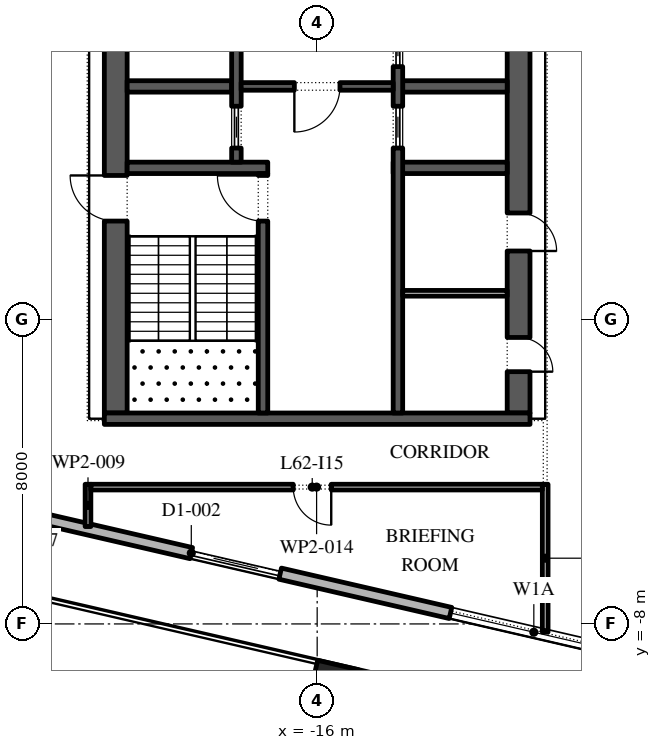
"""IFC4 building model, lengths in metres.
Left out: names, types, materials, properties, quantities, classifications, styles, units other than length and angle.
Written with IfcOpenShell. Run it as: python <this file> out.ifc"""

import sys

from ifc_helpers import new_model, si_unit, direction, frame, frame_2d, origin, origin_2d, place, context, subcontext, project, spatial, rectangle, extrude, element, fill, save


model = new_model("IFC4")
c1 = context("Model", 3, precision=1e-05, world=origin(), true_north=direction((0.0, 1.0)))
c2 = subcontext(c1, "Body", "Model", "MODEL_VIEW")
j1 = project(units=[si_unit("LENGTHUNIT", "METRE"), si_unit("PLANEANGLEUNIT", "RADIAN")], contexts=[c1])
p1 = place(None, origin())
s1 = spatial("IfcSite", under=j1, at=p1, CompositionType="ELEMENT")
p2 = place(p1, origin())
s2 = spatial("IfcBuilding", under=s1, at=p2, CompositionType="ELEMENT")
p3 = place(p2, frame((0.0, 0.0, 285.0)))
s3 = spatial("IfcBuildingStorey", under=s2, at=p3, CompositionType="ELEMENT", Elevation=285.0)
p4 = place(p3, frame((-15.574, -9.617, 0.0), z_axis=(0.0, 0.0, 1.0), x_axis=(0.974370064785, -0.224951054344, 0.0)))
e1 = element("IfcColumn", 1, at=p4, inside=s3, PredefinedType="COLUMN", context=c2, shape_type="SweptSolid", body=[
    extrude(rectangle(XDim=1.1, YDim=1.1, at=origin_2d()), origin(), (0.0, 0.0, 1.0), 4.2),
])
p5 = place(p3, frame((-29.616, -3.758, 0.0), z_axis=(0.0, 0.0, 1.0), x_axis=(0.974370532314, -0.224949029246, 0.0)))
e2 = element("IfcWall", 2, at=p5, inside=s3, PredefinedType="STANDARD", context=c2, shape_type="SweptSolid", body=[
    extrude(rectangle(XDim=48.0, YDim=0.3, at=frame_2d((24.0, 0.0))), origin(), (0.0, 0.0, 1.0), 4.0),
])
p6 = place(p5, frame((1.625, 0.0, 0.45)))
e3 = element("IfcOpeningElement", 3, at=p6, cuts=e2, PredefinedType="OPENING", context=c2, shape_type="SweptSolid", body=[
    extrude(rectangle(XDim=4.5, YDim=3.05, at=frame_2d((2.25, 1.525))), frame((0.0, 0.16, 0.0), z_axis=(0.0, -1.0, 0.0), x_axis=(1.0, 0.0, 0.0)), (0.0, 0.0, 1.0), 0.32),
])
p7 = place(p5, frame((10.575, 0.0, 0.0)))
e4 = element("IfcOpeningElement", 4, at=p7, cuts=e2, PredefinedType="OPENING", context=c2, shape_type="SweptSolid", body=[
    extrude(rectangle(XDim=2.4, YDim=3.5, at=frame_2d((1.2, 1.75))), frame((0.0, 0.16, 0.0), z_axis=(0.0, -1.0, 0.0), x_axis=(1.0, 0.0, 0.0)), (0.0, 0.0, 1.0), 0.32),
])
p8 = place(p5, frame((17.575, 0.0, 0.45)))
e5 = element("IfcOpeningElement", 5, at=p8, cuts=e2, PredefinedType="OPENING", context=c2, shape_type="SweptSolid", body=[
    extrude(rectangle(XDim=4.5, YDim=3.0, at=frame_2d((2.25, 1.5))), frame((0.0, 0.16, 0.0), z_axis=(0.0, -1.0, 0.0), x_axis=(1.0, 0.0, 0.0)), (0.0, 0.0, 1.0), 0.32),
])
p9 = place(p5, frame((25.625, 0.0, 0.45)))
e6 = element("IfcOpeningElement", 6, at=p9, cuts=e2, PredefinedType="OPENING", context=c2, shape_type="SweptSolid", body=[
    extrude(rectangle(XDim=4.5, YDim=2.95, at=frame_2d((2.25, 1.475))), frame((0.0, 0.16, 0.0), z_axis=(0.0, -1.0, 0.0), x_axis=(1.0, 0.0, 0.0)), (0.0, 0.0, 1.0), 0.32),
])
p10 = place(p5, frame((33.675, 0.0, 0.45)))
e7 = element("IfcOpeningElement", 7, at=p10, cuts=e2, PredefinedType="OPENING", context=c2, shape_type="SweptSolid", body=[
    extrude(rectangle(XDim=4.5, YDim=2.825, at=frame_2d((2.25, 1.413))), frame((0.0, 0.16, 0.0), z_axis=(0.0, -1.0, 0.0), x_axis=(1.0, 0.0, 0.0)), (0.0, 0.0, 1.0), 0.32),
])
p11 = place(p5, frame((42.775, 0.0, 0.0)))
e8 = element("IfcOpeningElement", 8, at=p11, cuts=e2, PredefinedType="OPENING", context=c2, shape_type="SweptSolid", body=[
    extrude(rectangle(XDim=2.4, YDim=3.5, at=frame_2d((1.2, 1.75))), frame((0.0, 0.16, 0.0), z_axis=(0.0, -1.0, 0.0), x_axis=(1.0, 0.0, 0.0)), (0.0, 0.0, 1.0), 0.32),
])
p12 = place(p3, frame((-21.359, 48.678, 0.0), z_axis=(0.0, 0.0, 1.0), x_axis=(-0.224949198343, -0.974370493275, 0.0)))
e9 = element("IfcWall", 9, at=p12, inside=s3, PredefinedType="STANDARD", context=c2, shape_type="SweptSolid", body=[
    extrude(rectangle(XDim=49.5, YDim=0.3, at=frame_2d((24.75, 0.0))), origin(), (0.0, 0.0, 1.0), 4.0),
])
p13 = place(p12, frame((1.157, 0.0, 0.45)))
e10 = element("IfcOpeningElement", 10, at=p13, cuts=e9, PredefinedType="OPENING", context=c2, shape_type="SweptSolid", body=[
    extrude(rectangle(XDim=4.5, YDim=3.05, at=frame_2d((2.25, 1.525))), frame((0.0, 0.16, 0.0), z_axis=(0.0, -1.0, 0.0), x_axis=(1.0, 0.0, 0.0)), (0.0, 0.0, 1.0), 0.32),
])
p14 = place(p12, frame((9.171, 0.0, 0.0)))
e11 = element("IfcOpeningElement", 11, at=p14, cuts=e9, PredefinedType="OPENING", context=c2, shape_type="SweptSolid", body=[
    extrude(rectangle(XDim=2.4, YDim=3.5, at=frame_2d((1.2, 1.75))), frame((0.0, 0.16, 0.0), z_axis=(0.0, -1.0, 0.0), x_axis=(1.0, 0.0, 0.0)), (0.0, 0.0, 1.0), 0.32),
])
p15 = place(p12, frame((15.236, 0.0, 0.45)))
e12 = element("IfcOpeningElement", 12, at=p15, cuts=e9, PredefinedType="OPENING", context=c2, shape_type="SweptSolid", body=[
    extrude(rectangle(XDim=4.5, YDim=3.05, at=frame_2d((2.25, 1.525))), frame((0.0, 0.16, 0.0), z_axis=(0.0, -1.0, 0.0), x_axis=(1.0, 0.0, 0.0)), (0.0, 0.0, 1.0), 0.32),
])
p16 = place(p12, frame((22.35, 0.0, 0.45)))
e13 = element("IfcOpeningElement", 13, at=p16, cuts=e9, PredefinedType="OPENING", context=c2, shape_type="SweptSolid", body=[
    extrude(rectangle(XDim=4.5, YDim=3.05, at=frame_2d((2.25, 1.525))), frame((0.0, 0.16, 0.0), z_axis=(0.0, -1.0, 0.0), x_axis=(1.0, 0.0, 0.0)), (0.0, 0.0, 1.0), 0.32),
])
p17 = place(p12, frame((29.464, 0.0, 0.45)))
e14 = element("IfcOpeningElement", 14, at=p17, cuts=e9, PredefinedType="OPENING", context=c2, shape_type="SweptSolid", body=[
    extrude(rectangle(XDim=4.5, YDim=3.05, at=frame_2d((2.25, 1.525))), frame((0.0, 0.16, 0.0), z_axis=(0.0, -1.0, 0.0), x_axis=(1.0, 0.0, 0.0)), (0.0, 0.0, 1.0), 0.32),
])
p18 = place(p12, frame((37.628, 0.0, 0.0)))
e15 = element("IfcOpeningElement", 15, at=p18, cuts=e9, PredefinedType="OPENING", context=c2, shape_type="SweptSolid", body=[
    extrude(rectangle(XDim=2.4, YDim=3.325, at=frame_2d((1.2, 1.663))), frame((0.0, 0.16, 0.0), z_axis=(0.0, -1.0, 0.0), x_axis=(1.0, 0.0, 0.0)), (0.0, 0.0, 1.0), 0.32),
])
p19 = place(p12, frame((43.693, 0.0, 0.45)))
e16 = element("IfcOpeningElement", 16, at=p19, cuts=e9, PredefinedType="OPENING", context=c2, shape_type="SweptSolid", body=[
    extrude(rectangle(XDim=4.5, YDim=2.825, at=frame_2d((2.25, 1.413))), frame((0.0, 0.16, 0.0), z_axis=(0.0, -1.0, 0.0), x_axis=(1.0, 0.0, 0.0)), (0.0, 0.0, 1.0), 0.32),
])
p20 = place(p3, frame((-21.3, -2.45, 0.0), z_axis=(0.0, 0.0, 1.0), x_axis=(0.0, 1.0, 0.0)))
e17 = element("IfcWall", 17, at=p20, inside=s3, PredefinedType="SHEAR", context=c2, shape_type="SweptSolid", body=[
    extrude(rectangle(XDim=27.9, YDim=0.6, at=frame_2d((13.95, 0.0))), origin(), (0.0, 0.0, 1.0), 4.0),
])
p21 = place(p20, frame((5.05, 0.0, 0.0)))
e18 = element("IfcOpeningElement", 18, at=p21, cuts=e17, PredefinedType="OPENING", context=c2, shape_type="SweptSolid", body=[
    extrude(rectangle(XDim=1.2, YDim=2.1, at=frame_2d((0.6, 1.05))), frame((0.0, 0.31, 0.0), z_axis=(0.0, -1.0, 0.0), x_axis=(1.0, 0.0, 0.0)), (0.0, 0.0, 1.0), 0.62),
])
p22 = place(p20, frame((21.65, 0.0, 0.0)))
e19 = element("IfcOpeningElement", 19, at=p22, cuts=e17, PredefinedType="OPENING", context=c2, shape_type="SweptSolid", body=[
    extrude(rectangle(XDim=1.2, YDim=2.1, at=frame_2d((0.6, 1.05))), frame((0.0, 0.31, 0.0), z_axis=(0.0, -1.0, 0.0), x_axis=(1.0, 0.0, 0.0)), (0.0, 0.0, 1.0), 0.62),
])
p23 = place(p3, frame((-10.7, -2.45, 0.0), z_axis=(0.0, 0.0, 1.0), x_axis=(0.0, 1.0, 0.0)))
e20 = element("IfcWall", 20, at=p23, inside=s3, PredefinedType="SHEAR", context=c2, shape_type="SweptSolid", body=[
    extrude(rectangle(XDim=27.9, YDim=0.6, at=frame_2d((13.95, 0.0))), origin(), (0.0, 0.0, 1.0), 4.0),
])
p24 = place(p23, frame((23.65, 0.0, 0.0)))
e21 = element("IfcOpeningElement", 21, at=p24, cuts=e20, PredefinedType="OPENING", context=c2, shape_type="SweptSolid", body=[
    extrude(rectangle(XDim=2.4, YDim=2.1, at=frame_2d((1.2, 1.05))), frame((0.0, 0.31, 0.0), z_axis=(0.0, -1.0, 0.0), x_axis=(1.0, 0.0, 0.0)), (0.0, 0.0, 1.0), 0.62),
])
p25 = place(p23, frame((1.087, 0.0, 0.0)))
e22 = element("IfcOpeningElement", 22, at=p25, cuts=e20, PredefinedType="OPENING", context=c2, shape_type="SweptSolid", body=[
    extrude(rectangle(XDim=0.9, YDim=2.1, at=frame_2d((0.45, 1.05))), frame((0.0, 0.31, 0.0), z_axis=(0.0, -1.0, 0.0), x_axis=(1.0, 0.0, 0.0)), (0.0, 0.0, 1.0), 0.62),
])
p26 = place(p23, frame((4.262, 0.0, 0.0)))
e23 = element("IfcOpeningElement", 23, at=p26, cuts=e20, PredefinedType="OPENING", context=c2, shape_type="SweptSolid", body=[
    extrude(rectangle(XDim=1.0, YDim=2.1, at=frame_2d((0.5, 1.05))), frame((0.0, 0.31, 0.0), z_axis=(0.0, -1.0, 0.0), x_axis=(1.0, 0.0, 0.0)), (0.0, 0.0, 1.0), 0.62),
])
p27 = place(p3, frame((-21.6, -2.6, 0.0), z_axis=(0.0, 0.0, 1.0), x_axis=(1.0, 0.0, 0.0)))
e24 = element("IfcWall", 24, at=p27, inside=s3, PredefinedType="SHEAR", context=c2, shape_type="SweptSolid", body=[
    extrude(rectangle(XDim=11.2, YDim=0.3, at=frame_2d((5.6, 0.0))), origin(), (0.0, 0.0, 1.0), 4.0),
])
p28 = place(p3, frame((-21.0, 4.0, 0.0), z_axis=(0.0, 0.0, 1.0), x_axis=(1.0, 0.0, 0.0)))
e25 = element("IfcWall", 25, at=p28, inside=s3, PredefinedType="SHEAR", context=c2, shape_type="SweptSolid", body=[
    extrude(rectangle(XDim=3.7, YDim=0.3, at=frame_2d((1.85, 0.0))), origin(), (0.0, 0.0, 1.0), 4.0),
])
p29 = place(p3, frame((-17.425, -2.45, 0.0), z_axis=(0.0, 0.0, 1.0), x_axis=(0.0, 1.0, 0.0)))
e26 = element("IfcWall", 26, at=p29, inside=s3, PredefinedType="SHEAR", context=c2, shape_type="SweptSolid", body=[
    extrude(rectangle(XDim=6.3, YDim=0.25, at=frame_2d((3.15, 0.0))), origin(), (0.0, 0.0, 1.0), 4.0),
])
p30 = place(p29, frame((5.05, 0.0, 0.0)))
e27 = element("IfcOpeningElement", 27, at=p30, cuts=e26, PredefinedType="OPENING", context=c2, shape_type="SweptSolid", body=[
    extrude(rectangle(XDim=1.2, YDim=2.1, at=frame_2d((0.6, 1.05))), frame((0.0, 0.135, 0.0), z_axis=(0.0, -1.0, 0.0), x_axis=(1.0, 0.0, 0.0)), (0.0, 0.0, 1.0), 0.27),
])
p31 = place(p3, frame((-21.0, 6.143, 0.0), z_axis=(0.0, 0.0, 1.0), x_axis=(1.0, 0.0, 0.0)))
e28 = element("IfcWall", 28, at=p31, inside=s3, PredefinedType="SHEAR", context=c2, shape_type="SweptSolid", body=[
    extrude(rectangle(XDim=2.75, YDim=0.3, at=frame_2d((1.375, 0.0))), origin(), (0.0, 0.0, 1.0), 4.0),
])
p32 = place(p3, frame((-18.125, 4.15, 0.0), z_axis=(0.0, 0.0, 1.0), x_axis=(0.0, 1.0, 0.0)))
e29 = element("IfcWall", 29, at=p32, inside=s3, PredefinedType="SHEAR", context=c2, shape_type="SweptSolid", body=[
    extrude(rectangle(XDim=14.7, YDim=0.25, at=frame_2d((7.35, 0.0))), origin(), (0.0, 0.0, 1.0), 4.0),
])
p33 = place(p32, frame((6.9, 0.0, 0.0)))
e30 = element("IfcOpeningElement", 30, at=p33, cuts=e29, PredefinedType="OPENING", context=c2, shape_type="SweptSolid", body=[
    extrude(rectangle(XDim=0.9, YDim=2.1, at=frame_2d((0.45, 1.05))), frame((0.0, 0.135, 0.0), z_axis=(0.0, -1.0, 0.0), x_axis=(1.0, 0.0, 0.0)), (0.0, 0.0, 1.0), 0.27),
])
p34 = place(p32, frame((0.371, 0.0, 0.0)))
e31 = element("IfcOpeningElement", 31, at=p34, cuts=e29, PredefinedType="OPENING", context=c2, shape_type="SweptSolid", body=[
    extrude(rectangle(XDim=1.1, YDim=2.1, at=frame_2d((0.55, 1.05))), frame((0.0, 0.135, 0.0), z_axis=(0.0, -1.0, 0.0), x_axis=(1.0, 0.0, 0.0)), (0.0, 0.0, 1.0), 0.27),
])
p35 = place(p32, frame((13.229, 0.0, 0.0)))
e32 = element("IfcOpeningElement", 32, at=p35, cuts=e29, PredefinedType="OPENING", context=c2, shape_type="SweptSolid", body=[
    extrude(rectangle(XDim=1.1, YDim=2.1, at=frame_2d((0.55, 1.05))), frame((0.0, 0.135, 0.0), z_axis=(0.0, -1.0, 0.0), x_axis=(1.0, 0.0, 0.0)), (0.0, 0.0, 1.0), 0.27),
])
p36 = place(p3, frame((-14.0, 4.0, 0.0), z_axis=(0.0, 0.0, 1.0), x_axis=(1.0, 0.0, 0.0)))
e33 = element("IfcWall", 33, at=p36, inside=s3, PredefinedType="SHEAR", context=c2, shape_type="SweptSolid", body=[
    extrude(rectangle(XDim=3.0, YDim=0.3, at=frame_2d((1.5, 0.0))), origin(), (0.0, 0.0, 1.0), 4.0),
])
p37 = place(p3, frame((-13.75, 6.143, 0.0), z_axis=(0.0, 0.0, 1.0), x_axis=(1.0, 0.0, 0.0)))
e34 = element("IfcWall", 34, at=p37, inside=s3, PredefinedType="SHEAR", context=c2, shape_type="SweptSolid", body=[
    extrude(rectangle(XDim=2.75, YDim=0.3, at=frame_2d((1.375, 0.0))), origin(), (0.0, 0.0, 1.0), 4.0),
])
p38 = place(p3, frame((-13.875, -2.45, 0.0), z_axis=(0.0, 0.0, 1.0), x_axis=(0.0, 1.0, 0.0)))
e35 = element("IfcWall", 35, at=p38, inside=s3, PredefinedType="SHEAR", context=c2, shape_type="SweptSolid", body=[
    extrude(rectangle(XDim=21.3, YDim=0.25, at=frame_2d((10.65, 0.0))), origin(), (0.0, 0.0, 1.0), 4.0),
])
p39 = place(p38, frame((17.786, 0.0, 0.0)))
e36 = element("IfcOpeningElement", 36, at=p39, cuts=e35, PredefinedType="OPENING", context=c2, shape_type="SweptSolid", body=[
    extrude(rectangle(XDim=0.9, YDim=2.1, at=frame_2d((0.45, 1.05))), frame((0.0, 0.135, 0.0), z_axis=(0.0, -1.0, 0.0), x_axis=(1.0, 0.0, 0.0)), (0.0, 0.0, 1.0), 0.27),
])
p40 = place(p38, frame((6.971, 0.0, 0.0)))
e37 = element("IfcOpeningElement", 37, at=p40, cuts=e35, PredefinedType="OPENING", context=c2, shape_type="SweptSolid", body=[
    extrude(rectangle(XDim=1.1, YDim=2.1, at=frame_2d((0.55, 1.05))), frame((0.0, 0.135, 0.0), z_axis=(0.0, -1.0, 0.0), x_axis=(1.0, 0.0, 0.0)), (0.0, 0.0, 1.0), 0.27),
])
p41 = place(p38, frame((9.114, 0.0, 0.0)))
e38 = element("IfcOpeningElement", 38, at=p41, cuts=e35, PredefinedType="OPENING", context=c2, shape_type="SweptSolid", body=[
    extrude(rectangle(XDim=1.1, YDim=2.1, at=frame_2d((0.55, 1.05))), frame((0.0, 0.135, 0.0), z_axis=(0.0, -1.0, 0.0), x_axis=(1.0, 0.0, 0.0)), (0.0, 0.0, 1.0), 0.27),
])
p42 = place(p38, frame((11.257, 0.0, 0.0)))
e39 = element("IfcOpeningElement", 39, at=p42, cuts=e35, PredefinedType="OPENING", context=c2, shape_type="SweptSolid", body=[
    extrude(rectangle(XDim=1.1, YDim=2.1, at=frame_2d((0.55, 1.05))), frame((0.0, 0.135, 0.0), z_axis=(0.0, -1.0, 0.0), x_axis=(1.0, 0.0, 0.0)), (0.0, 0.0, 1.0), 0.27),
])
p43 = place(p38, frame((13.4, 0.0, 0.0)))
e40 = element("IfcOpeningElement", 40, at=p43, cuts=e35, PredefinedType="OPENING", context=c2, shape_type="SweptSolid", body=[
    extrude(rectangle(XDim=1.1, YDim=2.1, at=frame_2d((0.55, 1.05))), frame((0.0, 0.135, 0.0), z_axis=(0.0, -1.0, 0.0), x_axis=(1.0, 0.0, 0.0)), (0.0, 0.0, 1.0), 0.27),
])
p44 = place(p3, frame((-18.0, 6.143, 0.0), z_axis=(0.0, 0.0, 1.0), x_axis=(1.0, 0.0, 0.0)))
e41 = element("IfcWall", 41, at=p44, inside=s3, PredefinedType="SHEAR", context=c2, shape_type="SweptSolid", body=[
    extrude(rectangle(XDim=4.0, YDim=0.2, at=frame_2d((2.0, 0.0))), origin(), (0.0, 0.0, 1.0), 4.0),
])
p45 = place(p44, frame((1.4, 0.0, 0.0)))
e42 = element("IfcOpeningElement", 42, at=p45, cuts=e41, PredefinedType="OPENING", context=c2, shape_type="SweptSolid", body=[
    extrude(rectangle(XDim=1.2, YDim=2.1, at=frame_2d((0.6, 1.05))), frame((0.0, 0.11, 0.0), z_axis=(0.0, -1.0, 0.0), x_axis=(1.0, 0.0, 0.0)), (0.0, 0.0, 1.0), 0.22),
])
p46 = place(p3, frame((-13.75, 0.7, 0.0), z_axis=(0.0, 0.0, 1.0), x_axis=(1.0, 0.0, 0.0)))
e43 = element("IfcWall", 43, at=p46, inside=s3, PredefinedType="PARTITIONING", context=c2, shape_type="SweptSolid", body=[
    extrude(rectangle(XDim=2.75, YDim=0.15, at=frame_2d((1.375, 0.0))), origin(), (0.0, 0.0, 1.0), 4.0),
])
p47 = place(p3, frame((-22.03, -4.325, 0.0), z_axis=(0.0, 0.0, 1.0), x_axis=(0.0, -1.0, 0.0)))
e44 = element("IfcWall", 44, at=p47, inside=s3, PredefinedType="PARTITIONING", context=c2, shape_type="SweptSolid", body=[
    extrude(rectangle(XDim=1.113, YDim=0.15, at=frame_2d((0.557, 0.0))), origin(), (0.0, 0.0, 1.0), 4.0),
])
p48 = place(p3, frame((-10.0, -8.216, 0.0), z_axis=(0.0, 0.0, 1.0), x_axis=(0.0, 1.0, 0.0)))
e45 = element("IfcWall", 45, at=p48, inside=s3, PredefinedType="PARTITIONING", context=c2, shape_type="SweptSolid", body=[
    extrude(rectangle(XDim=3.891, YDim=0.15, at=frame_2d((1.946, 0.0))), origin(), (0.0, 0.0, 1.0), 4.0),
])
p49 = place(p3, frame((-10.075, -4.4, 0.0), z_axis=(0.0, 0.0, 1.0), x_axis=(-1.0, 0.0, 0.0)))
e46 = element("IfcWall", 46, at=p49, inside=s3, PredefinedType="PARTITIONING", context=c2, shape_type="SweptSolid", body=[
    extrude(rectangle(XDim=11.88, YDim=0.15, at=frame_2d((5.94, 0.0))), origin(), (0.0, 0.0, 1.0), 4.0),
])
p50 = place(p49, frame((5.555, 0.0, 0.0)))
e47 = element("IfcOpeningElement", 47, at=p50, cuts=e46, PredefinedType="OPENING", context=c2, shape_type="SweptSolid", body=[
    extrude(rectangle(XDim=1.0, YDim=2.1, at=frame_2d((0.5, 1.05))), frame((0.0, 0.085, 0.0), z_axis=(0.0, -1.0, 0.0), x_axis=(1.0, 0.0, 0.0)), (0.0, 0.0, 1.0), 0.17),
])
p51 = place(p7, origin())
e48 = element("IfcDoor", 48, at=p51, inside=s3, OperationType="DOUBLE_DOOR_SLIDING", PredefinedType="DOOR", context=c2, shape_type="SweptSolid", body=[
    extrude(rectangle(XDim=2.4, YDim=3.5, at=frame_2d((1.2, 1.75))), frame((0.0, 0.025, 0.0), z_axis=(0.0, -1.0, 0.0), x_axis=(1.0, 0.0, 0.0)), (0.0, 0.0, 1.0), 0.05),
])
fill(e4, e48)
p52 = place(p8, origin())
e49 = element("IfcWindow", 49, at=p52, inside=s3, PartitioningType="DOUBLE_PANEL_VERTICAL", PredefinedType="WINDOW", context=c2, shape_type="SweptSolid", body=[
    extrude(rectangle(XDim=4.5, YDim=3.0, at=frame_2d((2.25, 1.5))), frame((0.0, 0.03, 0.0), z_axis=(0.0, -1.0, 0.0), x_axis=(1.0, 0.0, 0.0)), (0.0, 0.0, 1.0), 0.06),
])
fill(e5, e49)
p53 = place(p34, origin())
e50 = element("IfcDoor", 50, at=p53, inside=s3, OperationType="SLIDING_TO_LEFT", PredefinedType="DOOR", context=c2, shape_type="SweptSolid", body=[
    extrude(rectangle(XDim=1.1, YDim=2.1, at=frame_2d((0.55, 1.05))), frame((0.0, 0.025, 0.0), z_axis=(0.0, -1.0, 0.0), x_axis=(1.0, 0.0, 0.0)), (0.0, 0.0, 1.0), 0.05),
])
fill(e31, e50)
p54 = place(p40, origin())
e51 = element("IfcDoor", 51, at=p54, inside=s3, OperationType="SLIDING_TO_LEFT", PredefinedType="DOOR", context=c2, shape_type="SweptSolid", body=[
    extrude(rectangle(XDim=1.1, YDim=2.1, at=frame_2d((0.55, 1.05))), frame((0.0, 0.025, 0.0), z_axis=(0.0, -1.0, 0.0), x_axis=(1.0, 0.0, 0.0)), (0.0, 0.0, 1.0), 0.05),
])
fill(e37, e51)
p55 = place(p41, origin())
e52 = element("IfcDoor", 52, at=p55, inside=s3, OperationType="SLIDING_TO_LEFT", PredefinedType="DOOR", context=c2, shape_type="SweptSolid", body=[
    extrude(rectangle(XDim=1.1, YDim=2.1, at=frame_2d((0.55, 1.05))), frame((0.0, 0.025, 0.0), z_axis=(0.0, -1.0, 0.0), x_axis=(1.0, 0.0, 0.0)), (0.0, 0.0, 1.0), 0.05),
])
fill(e38, e52)
p56 = place(p45, frame((1.2, 0.0, 0.0), z_axis=(0.0, 0.0, 1.0), x_axis=(-1.0, 0.0, 0.0)))
e53 = element("IfcDoor", 53, at=p56, inside=s3, OperationType="SINGLE_SWING_LEFT", PredefinedType="DOOR", context=c2, shape_type="SweptSolid", body=[
    extrude(rectangle(XDim=1.2, YDim=2.1, at=frame_2d((0.6, 1.05))), frame((0.0, 0.025, 0.0), z_axis=(0.0, -1.0, 0.0), x_axis=(1.0, 0.0, 0.0)), (0.0, 0.0, 1.0), 0.05),
])
fill(e42, e53)
p57 = place(p30, origin())
e54 = element("IfcDoor", 54, at=p57, inside=s3, OperationType="SINGLE_SWING_LEFT", PredefinedType="DOOR", context=c2, shape_type="SweptSolid", body=[
    extrude(rectangle(XDim=1.2, YDim=2.1, at=frame_2d((0.6, 1.05))), frame((0.0, 0.025, 0.0), z_axis=(0.0, -1.0, 0.0), x_axis=(1.0, 0.0, 0.0)), (0.0, 0.0, 1.0), 0.05),
])
fill(e27, e54)
p58 = place(p21, origin())
e55 = element("IfcDoor", 55, at=p58, inside=s3, OperationType="SINGLE_SWING_LEFT", PredefinedType="DOOR", context=c2, shape_type="SweptSolid", body=[
    extrude(rectangle(XDim=1.2, YDim=2.1, at=frame_2d((0.6, 1.05))), frame((0.0, 0.025, 0.0), z_axis=(0.0, -1.0, 0.0), x_axis=(1.0, 0.0, 0.0)), (0.0, 0.0, 1.0), 0.05),
])
fill(e18, e55)
p59 = place(p25, frame((0.9, 0.55, 0.0), z_axis=(0.0, 0.0, 1.0), x_axis=(-1.0, 0.0, 0.0)))
e56 = element("IfcDoor", 56, at=p59, inside=s3, OperationType="SINGLE_SWING_LEFT", PredefinedType="DOOR", context=c2, shape_type="SweptSolid", body=[
    extrude(rectangle(XDim=0.9, YDim=2.1, at=frame_2d((0.45, 1.05))), frame((0.0, 0.3, 0.0), z_axis=(0.0, -1.0, 0.0), x_axis=(1.0, 0.0, 0.0)), (0.0, 0.0, 1.0), 0.05),
])
fill(e22, e56)
p60 = place(p26, frame((1.0, 0.55, 0.0), z_axis=(0.0, 0.0, 1.0), x_axis=(-1.0, 0.0, 0.0)))
e57 = element("IfcDoor", 57, at=p60, inside=s3, OperationType="SINGLE_SWING_LEFT", PredefinedType="DOOR", context=c2, shape_type="SweptSolid", body=[
    extrude(rectangle(XDim=1.0, YDim=2.1, at=frame_2d((0.5, 1.05))), frame((0.0, 0.3, 0.0), z_axis=(0.0, -1.0, 0.0), x_axis=(1.0, 0.0, 0.0)), (0.0, 0.0, 1.0), 0.05),
])
fill(e23, e57)
p61 = place(p50, origin())
e58 = element("IfcDoor", 58, at=p61, inside=s3, OperationType="SINGLE_SWING_RIGHT", PredefinedType="DOOR", context=c2, shape_type="SweptSolid", body=[
    extrude(rectangle(XDim=1.0, YDim=2.1, at=frame_2d((0.5, 1.05))), frame((0.0, 0.025, 0.0), z_axis=(0.0, -1.0, 0.0), x_axis=(1.0, 0.0, 0.0)), (0.0, 0.0, 1.0), 0.05),
])
fill(e47, e58)
save(model, sys.argv[1])
